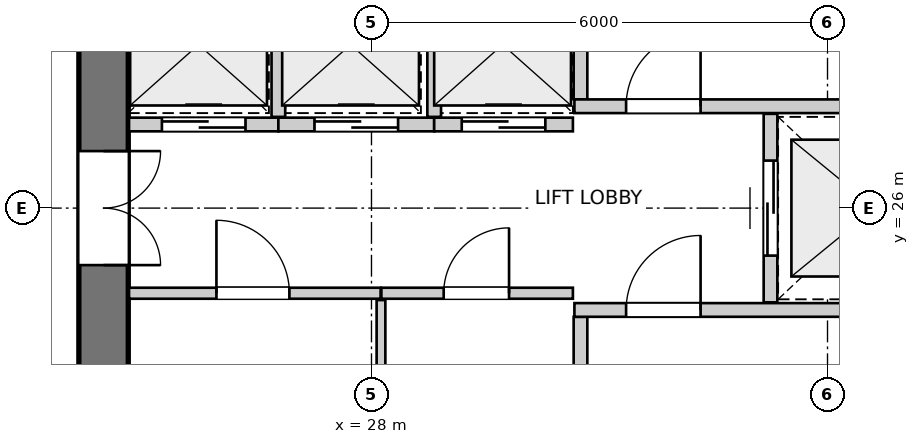
"""IFC4 building model, lengths in metres.
Left out: names, types, materials, properties, quantities, classifications, styles, units other than length and angle.
Written with IfcOpenShell. Run it as: python <this file> out.ifc"""

import sys

from ifc_helpers import new_model, si_unit, direction, frame, frame_2d, origin, place, context, subcontext, project, spatial, rectangle, extrude, source, transform, mapped, element, fill, save


model = new_model("IFC4")
c1 = context("Model", 3, precision=1e-05, world=origin(), true_north=direction((0.0, 1.0)))
c2 = subcontext(c1, "Body", "Model", "MODEL_VIEW")
j1 = project(units=[si_unit("LENGTHUNIT", "METRE"), si_unit("PLANEANGLEUNIT", "RADIAN")], contexts=[c1])
p1 = place(None, origin())
s1 = spatial("IfcSite", under=j1, at=p1, CompositionType="ELEMENT")
p2 = place(p1, origin())
s2 = spatial("IfcBuilding", under=s1, at=p2, CompositionType="ELEMENT")
p3 = place(p2, frame((0.0, 0.0, 142.6)))
s3 = spatial("IfcBuildingStorey", under=s2, at=p3, CompositionType="ELEMENT", Elevation=142.6)
p4 = place(p3, frame((24.475, 33.8, 0.0), z_axis=(0.0, 0.0, 1.0), x_axis=(0.0, -1.0, 0.0)))
e1 = element("IfcWall", 1, at=p4, inside=s3, PredefinedType="SHEAR", context=c2, shape_type="SweptSolid", body=[
    extrude(rectangle(XDim=15.6, YDim=0.65, at=frame_2d((7.8, 0.0))), origin(), (0.0, 0.0, 1.0), 2.95),
])
p5 = place(p4, frame((7.05, 0.0, 0.0)))
e2 = element("IfcOpeningElement", 2, at=p5, cuts=e1, PredefinedType="OPENING", context=c2, shape_type="SweptSolid", body=[
    extrude(rectangle(XDim=1.5, YDim=2.15, at=frame_2d((0.75, 1.075))), frame((0.0, 0.335, 0.0), z_axis=(0.0, -1.0, 0.0), x_axis=(1.0, 0.0, 0.0)), (0.0, 0.0, 1.0), 0.67),
])
p6 = place(p4, frame((3.52, 0.0, 0.0)))
e3 = element("IfcOpeningElement", 3, at=p6, cuts=e1, PredefinedType="OPENING", context=c2, shape_type="SweptSolid", body=[
    extrude(rectangle(XDim=0.86, YDim=2.05, at=frame_2d((0.43, 1.025))), frame((0.0, 0.335, 0.0), z_axis=(0.0, -1.0, 0.0), x_axis=(1.0, 0.0, 0.0)), (0.0, 0.0, 1.0), 0.67),
])
p7 = place(p4, frame((11.22, 0.0, 0.0)))
e4 = element("IfcOpeningElement", 4, at=p7, cuts=e1, PredefinedType="OPENING", context=c2, shape_type="SweptSolid", body=[
    extrude(rectangle(XDim=0.86, YDim=2.05, at=frame_2d((0.43, 1.025))), frame((0.0, 0.335, 0.0), z_axis=(0.0, -1.0, 0.0), x_axis=(1.0, 0.0, 0.0)), (0.0, 0.0, 1.0), 0.67),
])
p8 = place(p3, frame((30.75, 21.46, 0.0), z_axis=(0.0, 0.0, 1.0), x_axis=(0.0, 1.0, 0.0)))
e5 = element("IfcWall", 5, at=p8, inside=s3, PredefinedType="PARTITIONING", context=c2, shape_type="SweptSolid", body=[
    extrude(rectangle(XDim=3.11, YDim=0.18, at=frame_2d((1.555, 0.0))), origin(), (0.0, 0.0, 1.0), 2.95),
])
p9 = place(p8, frame((0.26, 0.0, 0.0)))
e6 = element("IfcOpeningElement", 6, at=p9, cuts=e5, PredefinedType="OPENING", context=c2, shape_type="SweptSolid", body=[
    extrude(rectangle(XDim=0.86, YDim=2.05, at=frame_2d((0.43, 1.025))), frame((0.0, 0.1, 0.0), z_axis=(0.0, -1.0, 0.0), x_axis=(1.0, 0.0, 0.0)), (0.0, 0.0, 1.0), 0.2),
])
p10 = place(p3, frame((30.67, 24.66, 0.0), z_axis=(0.0, 0.0, 1.0), x_axis=(1.0, 0.0, 0.0)))
e7 = element("IfcWall", 7, at=p10, inside=s3, PredefinedType="PARTITIONING", context=c2, shape_type="SweptSolid", body=[
    extrude(rectangle(XDim=5.22, YDim=0.18, at=frame_2d((2.61, 0.0))), origin(), (0.0, 0.0, 1.0), 2.95),
])
p11 = place(p10, frame((0.68, 0.0, 0.0)))
e8 = element("IfcOpeningElement", 8, at=p11, cuts=e7, PredefinedType="OPENING", context=c2, shape_type="SweptSolid", body=[
    extrude(rectangle(XDim=0.98, YDim=2.15, at=frame_2d((0.49, 1.075))), frame((0.0, 0.1, 0.0), z_axis=(0.0, -1.0, 0.0), x_axis=(1.0, 0.0, 0.0)), (0.0, 0.0, 1.0), 0.2),
])
p12 = place(p3, frame((30.75, 27.43, 0.0), z_axis=(0.0, 0.0, 1.0), x_axis=(0.0, 1.0, 0.0)))
e9 = element("IfcWall", 9, at=p12, inside=s3, PredefinedType="PARTITIONING", context=c2, shape_type="SweptSolid", body=[
    extrude(rectangle(XDim=3.11, YDim=0.18, at=frame_2d((1.555, 0.0))), origin(), (0.0, 0.0, 1.0), 2.95),
])
p13 = place(p12, frame((1.98, 0.0, 0.0)))
e10 = element("IfcOpeningElement", 10, at=p13, cuts=e9, PredefinedType="OPENING", context=c2, shape_type="SweptSolid", body=[
    extrude(rectangle(XDim=0.86, YDim=2.05, at=frame_2d((0.43, 1.025))), frame((0.0, 0.1, 0.0), z_axis=(0.0, -1.0, 0.0), x_axis=(1.0, 0.0, 0.0)), (0.0, 0.0, 1.0), 0.2),
])
p14 = place(p3, frame((30.67, 27.34, 0.0), z_axis=(0.0, 0.0, 1.0), x_axis=(1.0, 0.0, 0.0)))
e11 = element("IfcWall", 11, at=p14, inside=s3, PredefinedType="PARTITIONING", context=c2, shape_type="SweptSolid", body=[
    extrude(rectangle(XDim=5.22, YDim=0.18, at=frame_2d((2.61, 0.0))), origin(), (0.0, 0.0, 1.0), 2.95),
])
p15 = place(p14, frame((0.68, 0.0, 0.0)))
e12 = element("IfcOpeningElement", 12, at=p15, cuts=e11, PredefinedType="OPENING", context=c2, shape_type="SweptSolid", body=[
    extrude(rectangle(XDim=0.98, YDim=2.15, at=frame_2d((0.49, 1.075))), frame((0.0, 0.1, 0.0), z_axis=(0.0, -1.0, 0.0), x_axis=(1.0, 0.0, 0.0)), (0.0, 0.0, 1.0), 0.2),
])
p16 = place(p3, frame((33.25, 24.76, 0.0), z_axis=(0.0, 0.0, 1.0), x_axis=(0.0, 1.0, 0.0)))
e13 = element("IfcWall", 13, at=p16, inside=s3, PredefinedType="PARTITIONING", context=c2, shape_type="SweptSolid", body=[
    extrude(rectangle(XDim=2.48, YDim=0.18, at=frame_2d((1.24, 0.0))), origin(), (0.0, 0.0, 1.0), 2.95),
])
p17 = place(p16, frame((0.615, 0.0, 0.0)))
e14 = element("IfcOpeningElement", 14, at=p17, cuts=e13, PredefinedType="OPENING", context=c2, shape_type="SweptSolid", body=[
    extrude(rectangle(XDim=1.25, YDim=2.15, at=frame_2d((0.625, 1.075))), frame((0.0, 0.1, 0.0), z_axis=(0.0, -1.0, 0.0), x_axis=(1.0, 0.0, 0.0)), (0.0, 0.0, 1.0), 0.2),
])
p18 = place(p3, frame((24.81, 24.88, 0.0), z_axis=(0.0, 0.0, 1.0), x_axis=(1.0, 0.0, 0.0)))
e15 = element("IfcWall", 15, at=p18, inside=s3, PredefinedType="PARTITIONING", context=c2, shape_type="SweptSolid", body=[
    extrude(rectangle(XDim=3.31, YDim=0.145, at=frame_2d((1.655, 0.0))), origin(), (0.0, 0.0, 1.0), 2.95),
])
p19 = place(p18, frame((1.15, 0.0, 0.0)))
e16 = element("IfcOpeningElement", 16, at=p19, cuts=e15, PredefinedType="OPENING", context=c2, shape_type="SweptSolid", body=[
    extrude(rectangle(XDim=0.96, YDim=2.1, at=frame_2d((0.48, 1.05))), frame((0.0, 0.083, 0.0), z_axis=(0.0, -1.0, 0.0), x_axis=(1.0, 0.0, 0.0)), (0.0, 0.0, 1.0), 0.165),
])
p20 = place(p3, frame((28.13, 24.88, 0.0), z_axis=(0.0, 0.0, 1.0), x_axis=(1.0, 0.0, 0.0)))
e17 = element("IfcWall", 17, at=p20, inside=s3, PredefinedType="PARTITIONING", context=c2, shape_type="SweptSolid", body=[
    extrude(rectangle(XDim=2.52, YDim=0.145, at=frame_2d((1.26, 0.0))), origin(), (0.0, 0.0, 1.0), 2.95),
])
p21 = place(p20, frame((0.82, 0.0, 0.0)))
e18 = element("IfcOpeningElement", 18, at=p21, cuts=e17, PredefinedType="OPENING", context=c2, shape_type="SweptSolid", body=[
    extrude(rectangle(XDim=0.86, YDim=2.05, at=frame_2d((0.43, 1.025))), frame((0.0, 0.083, 0.0), z_axis=(0.0, -1.0, 0.0), x_axis=(1.0, 0.0, 0.0)), (0.0, 0.0, 1.0), 0.165),
])
p22 = place(p3, frame((28.125, 23.02, 0.0), z_axis=(0.0, 0.0, 1.0), x_axis=(0.0, 1.0, 0.0)))
e19 = element("IfcWall", 19, at=p22, inside=s3, PredefinedType="PARTITIONING", context=c2, shape_type="SweptSolid", body=[
    extrude(rectangle(XDim=1.77, YDim=0.115, at=frame_2d((0.885, 0.0))), origin(), (0.0, 0.0, 1.0), 2.95),
])
p23 = place(p3, frame((24.81, 27.1, 0.0), z_axis=(0.0, 0.0, 1.0), x_axis=(1.0, 0.0, 0.0)))
e20 = element("IfcWall", 20, at=p23, inside=s3, PredefinedType="PARTITIONING", context=c2, shape_type="SweptSolid", body=[
    extrude(rectangle(XDim=1.965, YDim=0.18, at=frame_2d((0.982, 0.0))), origin(), (0.0, 0.0, 1.0), 2.95),
])
p24 = place(p23, frame((0.433, 0.0, 0.0)))
e21 = element("IfcOpeningElement", 21, at=p24, cuts=e20, PredefinedType="OPENING", context=c2, shape_type="SweptSolid", body=[
    extrude(rectangle(XDim=1.1, YDim=2.15, at=frame_2d((0.55, 1.075))), frame((0.0, 0.1, 0.0), z_axis=(0.0, -1.0, 0.0), x_axis=(1.0, 0.0, 0.0)), (0.0, 0.0, 1.0), 0.2),
])
p25 = place(p3, frame((26.775, 27.1, 0.0), z_axis=(0.0, 0.0, 1.0), x_axis=(1.0, 0.0, 0.0)))
e22 = element("IfcWall", 22, at=p25, inside=s3, PredefinedType="PARTITIONING", context=c2, shape_type="SweptSolid", body=[
    extrude(rectangle(XDim=2.05, YDim=0.18, at=frame_2d((1.025, 0.0))), origin(), (0.0, 0.0, 1.0), 2.95),
])
p26 = place(p25, frame((0.475, 0.0, 0.0)))
e23 = element("IfcOpeningElement", 23, at=p26, cuts=e22, PredefinedType="OPENING", context=c2, shape_type="SweptSolid", body=[
    extrude(rectangle(XDim=1.1, YDim=2.15, at=frame_2d((0.55, 1.075))), frame((0.0, 0.1, 0.0), z_axis=(0.0, -1.0, 0.0), x_axis=(1.0, 0.0, 0.0)), (0.0, 0.0, 1.0), 0.2),
])
p27 = place(p3, frame((26.775, 27.2, 0.0), z_axis=(0.0, 0.0, 1.0), x_axis=(0.0, 1.0, 0.0)))
e24 = element("IfcWall", 24, at=p27, inside=s3, PredefinedType="PARTITIONING", context=c2, shape_type="SweptSolid", body=[
    extrude(rectangle(XDim=1.78, YDim=0.18, at=frame_2d((0.89, 0.0))), origin(), (0.0, 0.0, 1.0), 2.95),
])
p28 = place(p3, frame((28.825, 27.1, 0.0), z_axis=(0.0, 0.0, 1.0), x_axis=(1.0, 0.0, 0.0)))
e25 = element("IfcWall", 25, at=p28, inside=s3, PredefinedType="PARTITIONING", context=c2, shape_type="SweptSolid", body=[
    extrude(rectangle(XDim=1.825, YDim=0.18, at=frame_2d((0.913, 0.0))), origin(), (0.0, 0.0, 1.0), 2.95),
])
p29 = place(p28, frame((0.363, 0.0, 0.0)))
e26 = element("IfcOpeningElement", 26, at=p29, cuts=e25, PredefinedType="OPENING", context=c2, shape_type="SweptSolid", body=[
    extrude(rectangle(XDim=1.1, YDim=2.15, at=frame_2d((0.55, 1.075))), frame((0.0, 0.1, 0.0), z_axis=(0.0, -1.0, 0.0), x_axis=(1.0, 0.0, 0.0)), (0.0, 0.0, 1.0), 0.2),
])
p30 = place(p3, frame((28.825, 27.2, 0.0), z_axis=(0.0, 0.0, 1.0), x_axis=(0.0, 1.0, 0.0)))
e27 = element("IfcWall", 27, at=p30, inside=s3, PredefinedType="PARTITIONING", context=c2, shape_type="SweptSolid", body=[
    extrude(rectangle(XDim=1.78, YDim=0.18, at=frame_2d((0.89, 0.0))), origin(), (0.0, 0.0, 1.0), 2.95),
])
m1 = source(origin(), c2, "Body", "SweptSolid", [
    extrude(rectangle(XDim=1.5, YDim=2.15, at=frame_2d((0.75, 1.075))), frame((0.0, 0.025, 0.0), z_axis=(0.0, -1.0, 0.0), x_axis=(1.0, 0.0, 0.0)), (0.0, 0.0, 1.0), 0.05),
])
p31 = place(p5, origin())
e28 = element("IfcDoor", 28, at=p31, inside=s3, OperationType="DOUBLE_DOOR_SINGLE_SWING", PredefinedType="DOOR", context=c2, shape_type="MappedRepresentation", body=[
    mapped(m1, transform((0.0, 0.0, 0.0), x_axis=(1.0, 0.0, 0.0), y_axis=(0.0, 1.0, 0.0), z_axis=(0.0, 0.0, 1.0), scale=1.0)),
])
fill(e2, e28)
m2 = source(origin(), c2, "Body", "SweptSolid", [
    extrude(rectangle(XDim=0.98, YDim=2.15, at=frame_2d((0.49, 1.075))), frame((0.0, 0.025, 0.0), z_axis=(0.0, -1.0, 0.0), x_axis=(1.0, 0.0, 0.0)), (0.0, 0.0, 1.0), 0.05),
])
p32 = place(p11, origin())
e29 = element("IfcDoor", 29, at=p32, inside=s3, OperationType="SINGLE_SWING_RIGHT", PredefinedType="DOOR", context=c2, shape_type="MappedRepresentation", body=[
    mapped(m2, transform((0.0, 0.0, 0.0), x_axis=(1.0, 0.0, 0.0), y_axis=(0.0, 1.0, 0.0), z_axis=(0.0, 0.0, 1.0), scale=1.0)),
])
fill(e8, e29)
p33 = place(p15, origin())
e30 = element("IfcDoor", 30, at=p33, inside=s3, OperationType="SINGLE_SWING_RIGHT", PredefinedType="DOOR", context=c2, shape_type="MappedRepresentation", body=[
    mapped(m2, transform((0.0, 0.0, 0.0), x_axis=(1.0, 0.0, 0.0), y_axis=(0.0, 1.0, 0.0), z_axis=(0.0, 0.0, 1.0), scale=1.0)),
])
fill(e12, e30)
m3 = source(origin(), c2, "Body", "SweptSolid", [
    extrude(rectangle(XDim=1.25, YDim=2.15, at=frame_2d((0.625, 1.075))), frame((0.0, 0.025, 0.0), z_axis=(0.0, -1.0, 0.0), x_axis=(1.0, 0.0, 0.0)), (0.0, 0.0, 1.0), 0.05),
])
p34 = place(p17, origin())
e31 = element("IfcDoor", 31, at=p34, inside=s3, OperationType="DOUBLE_DOOR_SLIDING", PredefinedType="DOOR", context=c2, shape_type="MappedRepresentation", body=[
    mapped(m3, transform((0.0, 0.0, 0.0), x_axis=(1.0, 0.0, 0.0), y_axis=(0.0, 1.0, 0.0), z_axis=(0.0, 0.0, 1.0), scale=1.0)),
])
fill(e14, e31)
m4 = source(origin(), c2, "Body", "SweptSolid", [
    extrude(rectangle(XDim=0.96, YDim=2.1, at=frame_2d((0.48, 1.05))), frame((0.0, 0.025, 0.0), z_axis=(0.0, -1.0, 0.0), x_axis=(1.0, 0.0, 0.0)), (0.0, 0.0, 1.0), 0.05),
])
p35 = place(p19, origin())
e32 = element("IfcDoor", 32, at=p35, inside=s3, OperationType="SINGLE_SWING_LEFT", PredefinedType="DOOR", context=c2, shape_type="MappedRepresentation", body=[
    mapped(m4, transform((0.0, 0.0, 0.0), x_axis=(1.0, 0.0, 0.0), y_axis=(0.0, 1.0, 0.0), z_axis=(0.0, 0.0, 1.0), scale=1.0)),
])
fill(e16, e32)
m5 = source(origin(), c2, "Body", "SweptSolid", [
    extrude(rectangle(XDim=0.86, YDim=2.05, at=frame_2d((0.43, 1.025))), frame((0.0, 0.025, 0.0), z_axis=(0.0, -1.0, 0.0), x_axis=(1.0, 0.0, 0.0)), (0.0, 0.0, 1.0), 0.05),
])
p36 = place(p21, origin())
e33 = element("IfcDoor", 33, at=p36, inside=s3, OperationType="SINGLE_SWING_RIGHT", PredefinedType="DOOR", context=c2, shape_type="MappedRepresentation", body=[
    mapped(m5, transform((0.0, 0.0, 0.0), x_axis=(1.0, 0.0, 0.0), y_axis=(0.0, 1.0, 0.0), z_axis=(0.0, 0.0, 1.0), scale=1.0)),
])
fill(e18, e33)
m6 = source(origin(), c2, "Body", "SweptSolid", [
    extrude(rectangle(XDim=1.1, YDim=2.15, at=frame_2d((0.55, 1.075))), frame((0.0, 0.025, 0.0), z_axis=(0.0, -1.0, 0.0), x_axis=(1.0, 0.0, 0.0)), (0.0, 0.0, 1.0), 0.05),
])
p37 = place(p24, origin())
e34 = element("IfcDoor", 34, at=p37, inside=s3, OperationType="DOUBLE_DOOR_SLIDING", PredefinedType="DOOR", context=c2, shape_type="MappedRepresentation", body=[
    mapped(m6, transform((0.0, 0.0, 0.0), x_axis=(1.0, 0.0, 0.0), y_axis=(0.0, 1.0, 0.0), z_axis=(0.0, 0.0, 1.0), scale=1.0)),
])
fill(e21, e34)
p38 = place(p26, origin())
e35 = element("IfcDoor", 35, at=p38, inside=s3, OperationType="DOUBLE_DOOR_SLIDING", PredefinedType="DOOR", context=c2, shape_type="MappedRepresentation", body=[
    mapped(m6, transform((0.0, 0.0, 0.0), x_axis=(1.0, 0.0, 0.0), y_axis=(0.0, 1.0, 0.0), z_axis=(0.0, 0.0, 1.0), scale=1.0)),
])
fill(e23, e35)
p39 = place(p29, origin())
e36 = element("IfcDoor", 36, at=p39, inside=s3, OperationType="DOUBLE_DOOR_SLIDING", PredefinedType="DOOR", context=c2, shape_type="MappedRepresentation", body=[
    mapped(m6, transform((0.0, 0.0, 0.0), x_axis=(1.0, 0.0, 0.0), y_axis=(0.0, 1.0, 0.0), z_axis=(0.0, 0.0, 1.0), scale=1.0)),
])
fill(e26, e36)
save(model, sys.argv[1])
